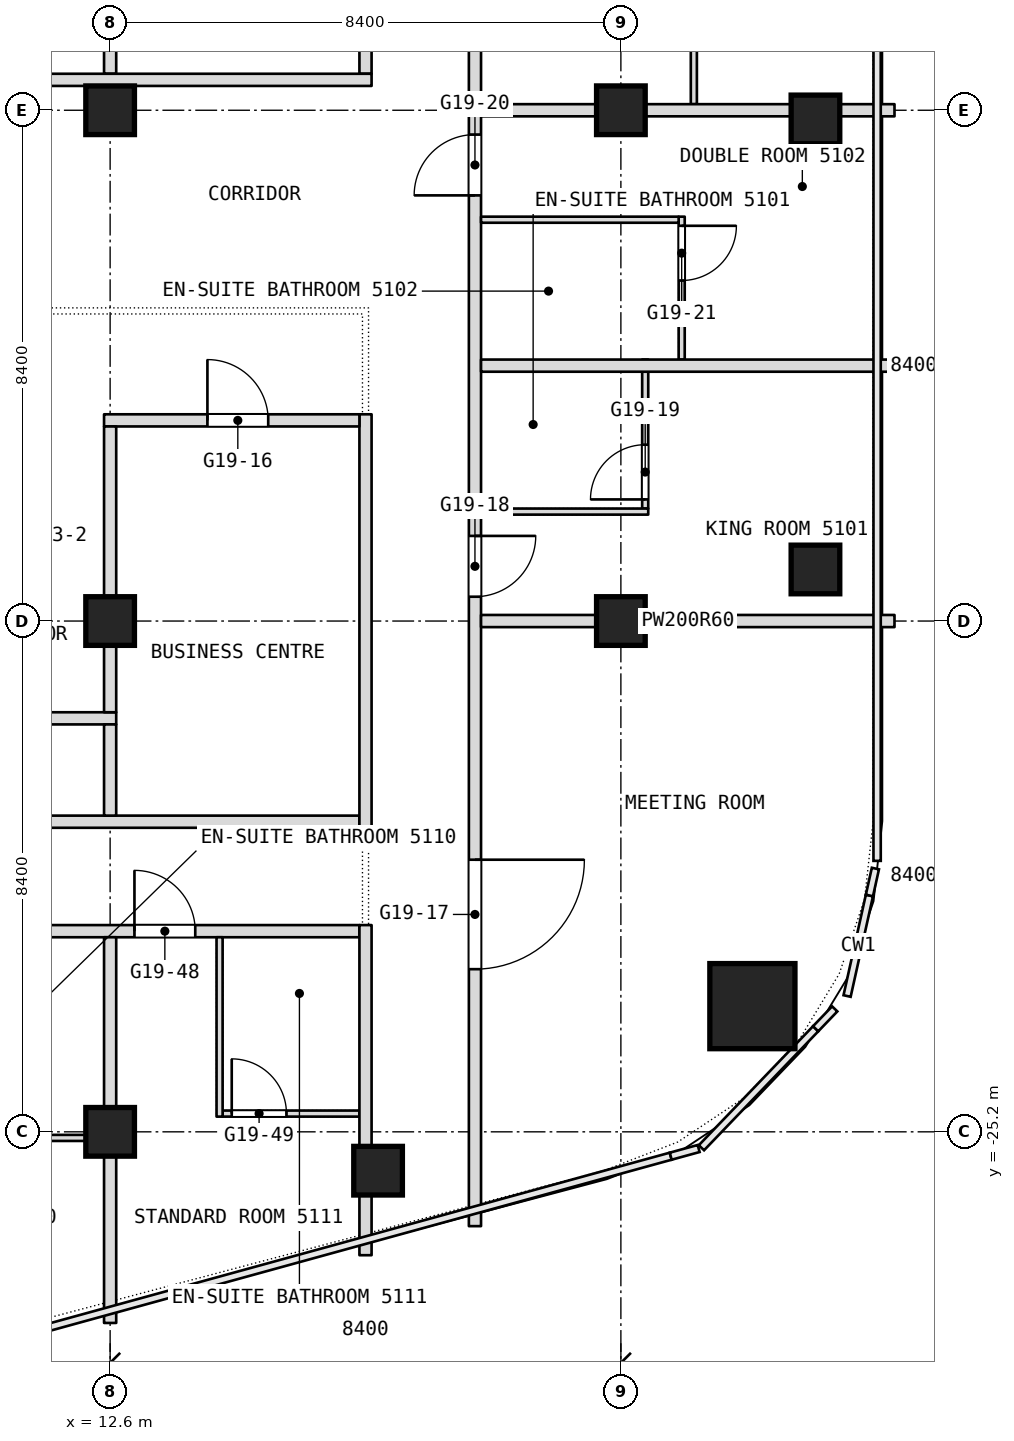
"""IFC4 building model, lengths in metres.
Left out: names, types, materials, properties, quantities, classifications, styles, units other than length and angle.
Written with IfcOpenShell. Run it as: python <this file> out.ifc"""

import sys

from ifc_helpers import new_model, si_unit, direction, frame, frame_2d, origin, origin_2d, place, context, subcontext, project, spatial, rectangle, extrude, element, fill, save


model = new_model("IFC4")
c1 = context("Model", 3, precision=1e-05, world=origin(), true_north=direction((0.0, 1.0)))
c2 = subcontext(c1, "Body", "Model", "MODEL_VIEW")
j1 = project(units=[si_unit("LENGTHUNIT", "METRE"), si_unit("PLANEANGLEUNIT", "RADIAN")], contexts=[c1])
p1 = place(None, origin())
s1 = spatial("IfcSite", under=j1, at=p1, CompositionType="ELEMENT")
p2 = place(p1, origin())
s2 = spatial("IfcBuilding", under=s1, at=p2, CompositionType="ELEMENT")
p3 = place(p2, frame((0.0, 0.0, 220.1)))
s3 = spatial("IfcBuildingStorey", under=s2, at=p3, CompositionType="ELEMENT", Elevation=220.1)
p4 = place(p3, frame((23.163, -23.133, 0.0), z_axis=(0.0, 0.0, 1.0), x_axis=(1.0, 0.0, 0.0)))
e1 = element("IfcColumn", 1, at=p4, inside=s3, PredefinedType="COLUMN", context=c2, shape_type="SweptSolid", body=[
    extrude(rectangle(XDim=1.4, YDim=1.4, at=origin_2d()), origin(), (0.0, 0.0, 1.0), 3.6),
])
for number, where, z_axis, x_axis in (
    (2, (12.6, -25.2, 0.0), (0.0, 0.0, 1.0), (1.0, 0.0, 0.0)),
    (3, (12.6, -16.8, 0.0), (0.0, 0.0, 1.0), (1.0, 0.0, 0.0)),
    (4, (12.6, -8.4, 0.0), (0.0, 0.0, 1.0), (1.0, 0.0, 0.0)),
    (5, (21.0, -16.8, 0.0), (0.0, 0.0, 1.0), (1.0, 0.0, 0.0)),
    (6, (21.0, -8.4, 0.0), (0.0, 0.0, 1.0), (1.0, 0.0, 0.0)),
    (7, (24.2, -8.551, 0.0), (0.0, 0.0, 1.0), (1.0, 0.0, 0.0)),
    (8, (24.2, -15.952, 0.0), (0.0, 0.0, 1.0), (1.0, 0.0, 0.0)),
    (9, (17.007, -25.839, 0.0), (0.0, 0.0, 1.0), (1.0, 0.0, 0.0)),
):
    element("IfcColumn", number, at=place(p3, frame(where, z_axis=z_axis, x_axis=x_axis)), inside=s3, PredefinedType="COLUMN", context=c2, shape_type="SweptSolid", body=[
        extrude(rectangle(XDim=0.8, YDim=0.8, at=origin_2d()), origin(), (0.0, 0.0, 1.0), 3.6),
    ])
p5 = place(p3, frame((10.25, -25.3, 0.0), z_axis=(0.0, 0.0, 1.0), x_axis=(1.0, 0.0, 0.0)))
e10 = element("IfcWall", 10, at=p5, inside=s3, PredefinedType="PARTITIONING", context=c2, shape_type="SweptSolid", body=[
    extrude(rectangle(XDim=2.45, YDim=0.1, at=frame_2d((1.225, 0.0))), origin(), (0.0, 0.0, 1.0), 2.94),
])
p6 = place(p5, frame((0.15, 0.0, 0.0)))
e11 = element("IfcOpeningElement", 11, at=p6, cuts=e10, PredefinedType="OPENING", context=c2, shape_type="SweptSolid", body=[
    extrude(rectangle(XDim=0.9, YDim=2.1, at=frame_2d((0.45, 1.05))), frame((0.0, 0.05, 0.0), z_axis=(0.0, -1.0, 0.0), x_axis=(1.0, 0.0, 0.0)), (0.0, 0.0, 1.0), 0.1),
])
p7 = place(p3, frame((14.45, -24.9, 0.0), z_axis=(0.0, 0.0, 1.0), x_axis=(1.0, 0.0, 0.0)))
e12 = element("IfcWall", 12, at=p7, inside=s3, PredefinedType="PARTITIONING", context=c2, shape_type="SweptSolid", body=[
    extrude(rectangle(XDim=2.25, YDim=0.1, at=frame_2d((1.125, 0.0))), origin(), (0.0, 0.0, 1.0), 3.34),
])
p8 = place(p7, frame((0.15, 0.0, 0.0)))
e13 = element("IfcOpeningElement", 13, at=p8, cuts=e12, PredefinedType="OPENING", context=c2, shape_type="SweptSolid", body=[
    extrude(rectangle(XDim=0.9, YDim=2.1, at=frame_2d((0.45, 1.05))), frame((0.0, 0.05, 0.0), z_axis=(0.0, -1.0, 0.0), x_axis=(1.0, 0.0, 0.0)), (0.0, 0.0, 1.0), 0.1),
])
p9 = place(p3, frame((22.2, -8.3, 0.0), z_axis=(0.0, 0.0, 1.0), x_axis=(0.0, 1.0, 0.0)))
e14 = element("IfcWall", 14, at=p9, inside=s3, PredefinedType="PARTITIONING", context=c2, shape_type="SweptSolid", body=[
    extrude(rectangle(XDim=3.55, YDim=0.1, at=frame_2d((1.775, 0.0))), origin(), (0.0, 0.0, 1.0), 3.34),
])
p10 = place(p9, frame((2.5, 0.0, 0.0)))
e15 = element("IfcOpeningElement", 15, at=p10, cuts=e14, PredefinedType="OPENING", context=c2, shape_type="SweptSolid", body=[
    extrude(rectangle(XDim=0.9, YDim=2.1, at=frame_2d((0.45, 1.05))), frame((0.0, 0.05, 0.0), z_axis=(0.0, -1.0, 0.0), x_axis=(1.0, 0.0, 0.0)), (0.0, 0.0, 1.0), 0.1),
])
p11 = place(p3, frame((22.0, -12.5, 0.0), z_axis=(0.0, 0.0, 1.0), x_axis=(0.0, 1.0, 0.0)))
e16 = element("IfcWall", 16, at=p11, inside=s3, PredefinedType="PARTITIONING", context=c2, shape_type="SweptSolid", body=[
    extrude(rectangle(XDim=2.35, YDim=0.1, at=frame_2d((1.175, 0.0))), origin(), (0.0, 0.0, 1.0), 3.34),
])
p12 = place(p11, frame((1.3, 0.0, 0.0)))
e17 = element("IfcOpeningElement", 17, at=p12, cuts=e16, PredefinedType="OPENING", context=c2, shape_type="SweptSolid", body=[
    extrude(rectangle(XDim=0.9, YDim=2.1, at=frame_2d((0.45, 1.05))), frame((0.0, 0.05, 0.0), z_axis=(0.0, -1.0, 0.0), x_axis=(1.0, 0.0, 0.0)), (0.0, 0.0, 1.0), 0.1),
])
p13 = place(p3, frame((-16.7, -21.9, 0.0), z_axis=(0.0, 0.0, 1.0), x_axis=(1.0, 0.0, 0.0)))
e18 = element("IfcWall", 18, at=p13, inside=s3, PredefinedType="PARTITIONING", context=c2, shape_type="SweptSolid", body=[
    extrude(rectangle(XDim=33.4, YDim=0.2, at=frame_2d((16.7, 0.0))), origin(), (0.0, 0.0, 1.0), 3.34),
])
p14 = place(p13, frame((0.3, 0.0, 0.0)))
e19 = element("IfcOpeningElement", 19, at=p14, cuts=e18, PredefinedType="OPENING", context=c2, shape_type="SweptSolid", body=[
    extrude(rectangle(XDim=1.0, YDim=2.1, at=frame_2d((0.5, 1.05))), frame((0.0, 0.1, 0.0), z_axis=(0.0, -1.0, 0.0), x_axis=(1.0, 0.0, 0.0)), (0.0, 0.0, 1.0), 0.2),
])
p15 = place(p13, frame((7.8, 0.0, 0.0)))
e20 = element("IfcOpeningElement", 20, at=p15, cuts=e18, PredefinedType="OPENING", context=c2, shape_type="SweptSolid", body=[
    extrude(rectangle(XDim=1.1, YDim=2.1, at=frame_2d((0.55, 1.05))), frame((0.0, 0.1, 0.0), z_axis=(0.0, -1.0, 0.0), x_axis=(1.0, 0.0, 0.0)), (0.0, 0.0, 1.0), 0.2),
])
p16 = place(p13, frame((14.05, 0.0, 0.0)))
e21 = element("IfcOpeningElement", 21, at=p16, cuts=e18, PredefinedType="OPENING", context=c2, shape_type="SweptSolid", body=[
    extrude(rectangle(XDim=1.1, YDim=2.1, at=frame_2d((0.55, 1.05))), frame((0.0, 0.1, 0.0), z_axis=(0.0, -1.0, 0.0), x_axis=(1.0, 0.0, 0.0)), (0.0, 0.0, 1.0), 0.2),
])
p17 = place(p13, frame((23.7, 0.0, 0.0)))
e22 = element("IfcOpeningElement", 22, at=p17, cuts=e18, PredefinedType="OPENING", context=c2, shape_type="SweptSolid", body=[
    extrude(rectangle(XDim=1.0, YDim=2.1, at=frame_2d((0.5, 1.05))), frame((0.0, 0.1, 0.0), z_axis=(0.0, -1.0, 0.0), x_axis=(1.0, 0.0, 0.0)), (0.0, 0.0, 1.0), 0.2),
])
p18 = place(p13, frame((25.5, 0.0, 0.0)))
e23 = element("IfcOpeningElement", 23, at=p18, cuts=e18, PredefinedType="OPENING", context=c2, shape_type="SweptSolid", body=[
    extrude(rectangle(XDim=1.0, YDim=2.1, at=frame_2d((0.5, 1.05))), frame((0.0, 0.1, 0.0), z_axis=(0.0, -1.0, 0.0), x_axis=(1.0, 0.0, 0.0)), (0.0, 0.0, 1.0), 0.2),
])
p19 = place(p13, frame((29.7, 0.0, 0.0)))
e24 = element("IfcOpeningElement", 24, at=p19, cuts=e18, PredefinedType="OPENING", context=c2, shape_type="SweptSolid", body=[
    extrude(rectangle(XDim=1.0, YDim=2.1, at=frame_2d((0.5, 1.05))), frame((0.0, 0.1, 0.0), z_axis=(0.0, -1.0, 0.0), x_axis=(1.0, 0.0, 0.0)), (0.0, 0.0, 1.0), 0.2),
])
p20 = place(p3, frame((21.4, -14.95, 0.0), z_axis=(0.0, 0.0, 1.0), x_axis=(0.0, 1.0, 0.0)))
e25 = element("IfcWall", 25, at=p20, inside=s3, PredefinedType="PARTITIONING", context=c2, shape_type="SweptSolid", body=[
    extrude(rectangle(XDim=2.45, YDim=0.1, at=frame_2d((1.225, 0.0))), origin(), (0.0, 0.0, 1.0), 3.34),
])
p21 = place(p20, frame((0.15, 0.0, 0.0)))
e26 = element("IfcOpeningElement", 26, at=p21, cuts=e25, PredefinedType="OPENING", context=c2, shape_type="SweptSolid", body=[
    extrude(rectangle(XDim=0.9, YDim=2.1, at=frame_2d((0.45, 1.05))), frame((0.0, 0.05, 0.0), z_axis=(0.0, -1.0, 0.0), x_axis=(1.0, 0.0, 0.0)), (0.0, 0.0, 1.0), 0.1),
])
p22 = place(p3, frame((-16.7, -20.1, 0.0), z_axis=(0.0, 0.0, 1.0), x_axis=(1.0, 0.0, 0.0)))
e27 = element("IfcWall", 27, at=p22, inside=s3, PredefinedType="PARTITIONING", context=c2, shape_type="SweptSolid", body=[
    extrude(rectangle(XDim=33.4, YDim=0.2, at=frame_2d((16.7, 0.0))), origin(), (0.0, 0.0, 1.0), 3.34),
])
p23 = place(p3, frame((18.6, -26.751, 0.0), z_axis=(0.0, 0.0, 1.0), x_axis=(0.0, 1.0, 0.0)))
e28 = element("IfcWall", 28, at=p23, inside=s3, PredefinedType="PARTITIONING", context=c2, shape_type="SweptSolid", body=[
    extrude(rectangle(XDim=49.091, YDim=0.2, at=frame_2d((24.545, 0.0))), origin(), (0.0, 0.0, 1.0), 3.34),
])
p24 = place(p23, frame((4.226, 0.0, 0.0)))
e29 = element("IfcOpeningElement", 29, at=p24, cuts=e28, PredefinedType="OPENING", context=c2, shape_type="SweptSolid", body=[
    extrude(rectangle(XDim=1.8, YDim=2.1, at=frame_2d((0.9, 1.05))), frame((0.0, 0.1, 0.0), z_axis=(0.0, -1.0, 0.0), x_axis=(1.0, 0.0, 0.0)), (0.0, 0.0, 1.0), 0.2),
])
p25 = place(p23, frame((10.351, 0.0, 0.0)))
e30 = element("IfcOpeningElement", 30, at=p25, cuts=e28, PredefinedType="OPENING", context=c2, shape_type="SweptSolid", body=[
    extrude(rectangle(XDim=1.0, YDim=2.1, at=frame_2d((0.5, 1.05))), frame((0.0, 0.1, 0.0), z_axis=(0.0, -1.0, 0.0), x_axis=(1.0, 0.0, 0.0)), (0.0, 0.0, 1.0), 0.2),
])
p26 = place(p23, frame((16.951, 0.0, 0.0)))
e31 = element("IfcOpeningElement", 31, at=p26, cuts=e28, PredefinedType="OPENING", context=c2, shape_type="SweptSolid", body=[
    extrude(rectangle(XDim=1.0, YDim=2.1, at=frame_2d((0.5, 1.05))), frame((0.0, 0.1, 0.0), z_axis=(0.0, -1.0, 0.0), x_axis=(1.0, 0.0, 0.0)), (0.0, 0.0, 1.0), 0.2),
])
p27 = place(p23, frame((22.051, 0.0, 0.0)))
e32 = element("IfcOpeningElement", 32, at=p27, cuts=e28, PredefinedType="OPENING", context=c2, shape_type="SweptSolid", body=[
    extrude(rectangle(XDim=1.1, YDim=2.1, at=frame_2d((0.55, 1.05))), frame((0.0, 0.1, 0.0), z_axis=(0.0, -1.0, 0.0), x_axis=(1.0, 0.0, 0.0)), (0.0, 0.0, 1.0), 0.2),
])
p28 = place(p23, frame((30.051, 0.0, 0.0)))
e33 = element("IfcOpeningElement", 33, at=p28, cuts=e28, PredefinedType="OPENING", context=c2, shape_type="SweptSolid", body=[
    extrude(rectangle(XDim=1.8, YDim=2.1, at=frame_2d((0.9, 1.05))), frame((0.0, 0.1, 0.0), z_axis=(0.0, -1.0, 0.0), x_axis=(1.0, 0.0, 0.0)), (0.0, 0.0, 1.0), 0.2),
])
p29 = place(p23, frame((38.851, 0.0, 0.0)))
e34 = element("IfcOpeningElement", 34, at=p29, cuts=e28, PredefinedType="OPENING", context=c2, shape_type="SweptSolid", body=[
    extrude(rectangle(XDim=1.1, YDim=2.1, at=frame_2d((0.55, 1.05))), frame((0.0, 0.1, 0.0), z_axis=(0.0, -1.0, 0.0), x_axis=(1.0, 0.0, 0.0)), (0.0, 0.0, 1.0), 0.2),
])
p30 = place(p23, frame((44.051, 0.0, 0.0)))
e35 = element("IfcOpeningElement", 35, at=p30, cuts=e28, PredefinedType="OPENING", context=c2, shape_type="SweptSolid", body=[
    extrude(rectangle(XDim=1.0, YDim=2.1, at=frame_2d((0.5, 1.05))), frame((0.0, 0.1, 0.0), z_axis=(0.0, -1.0, 0.0), x_axis=(1.0, 0.0, 0.0)), (0.0, 0.0, 1.0), 0.2),
])
p31 = place(p3, frame((5.7, -18.4, 0.0), z_axis=(0.0, 0.0, 1.0), x_axis=(1.0, 0.0, 0.0)))
e36 = element("IfcWall", 36, at=p31, inside=s3, PredefinedType="PARTITIONING", context=c2, shape_type="SweptSolid", body=[
    extrude(rectangle(XDim=7.0, YDim=0.2, at=frame_2d((3.5, 0.0))), origin(), (0.0, 0.0, 1.0), 3.34),
])
p32 = place(p31, frame((1.8, 0.0, 0.0)))
e37 = element("IfcOpeningElement", 37, at=p32, cuts=e36, PredefinedType="OPENING", context=c2, shape_type="SweptSolid", body=[
    extrude(rectangle(XDim=1.8, YDim=2.1, at=frame_2d((0.9, 1.05))), frame((0.0, 0.1, 0.0), z_axis=(0.0, -1.0, 0.0), x_axis=(1.0, 0.0, 0.0)), (0.0, 0.0, 1.0), 0.2),
])
p33 = place(p3, frame((16.8, -27.229, 0.0), z_axis=(0.0, 0.0, 1.0), x_axis=(0.0, 1.0, 0.0)))
e38 = element("IfcWall", 38, at=p33, inside=s3, PredefinedType="PARTITIONING", context=c2, shape_type="SweptSolid", body=[
    extrude(rectangle(XDim=5.429, YDim=0.2, at=frame_2d((2.714, 0.0))), origin(), (0.0, 0.0, 1.0), 3.34),
])
p34 = place(p3, frame((16.8, -20.2, 0.0), z_axis=(0.0, 0.0, 1.0), x_axis=(0.0, 1.0, 0.0)))
e39 = element("IfcWall", 39, at=p34, inside=s3, PredefinedType="PARTITIONING", context=c2, shape_type="SweptSolid", body=[
    extrude(rectangle(XDim=6.8, YDim=0.2, at=frame_2d((3.4, 0.0))), origin(), (0.0, 0.0, 1.0), 3.34),
])
p35 = place(p3, frame((16.8, -7.8, 0.0), z_axis=(0.0, 0.0, 1.0), x_axis=(0.0, 1.0, 0.0)))
e40 = element("IfcWall", 40, at=p35, inside=s3, PredefinedType="PARTITIONING", context=c2, shape_type="SweptSolid", body=[
    extrude(rectangle(XDim=5.9, YDim=0.2, at=frame_2d((2.95, 0.0))), origin(), (0.0, 0.0, 1.0), 3.34),
])
p36 = place(p3, frame((18.7, -16.8, 0.0), z_axis=(0.0, 0.0, 1.0), x_axis=(1.0, 0.0, 0.0)))
e41 = element("IfcWall", 41, at=p36, inside=s3, PredefinedType="PARTITIONING", context=c2, shape_type="SweptSolid", body=[
    extrude(rectangle(XDim=6.8, YDim=0.2, at=frame_2d((3.4, 0.0))), origin(), (0.0, 0.0, 1.0), 2.94),
])
p37 = place(p3, frame((18.7, -15.0, 0.0), z_axis=(0.0, 0.0, 1.0), x_axis=(1.0, 0.0, 0.0)))
e42 = element("IfcWall", 42, at=p37, inside=s3, PredefinedType="PARTITIONING", context=c2, shape_type="SweptSolid", body=[
    extrude(rectangle(XDim=2.75, YDim=0.1, at=frame_2d((1.375, 0.0))), origin(), (0.0, 0.0, 1.0), 3.34),
])
p38 = place(p3, frame((14.4, -24.95, 0.0), z_axis=(0.0, 0.0, 1.0), x_axis=(0.0, 1.0, 0.0)))
e43 = element("IfcWall", 43, at=p38, inside=s3, PredefinedType="PARTITIONING", context=c2, shape_type="SweptSolid", body=[
    extrude(rectangle(XDim=2.95, YDim=0.1, at=frame_2d((1.475, 0.0))), origin(), (0.0, 0.0, 1.0), 3.34),
])
p39 = place(p3, frame((12.5, -13.5, 0.0), z_axis=(0.0, 0.0, 1.0), x_axis=(1.0, 0.0, 0.0)))
e44 = element("IfcWall", 44, at=p39, inside=s3, PredefinedType="PARTITIONING", context=c2, shape_type="SweptSolid", body=[
    extrude(rectangle(XDim=4.2, YDim=0.2, at=frame_2d((2.1, 0.0))), origin(), (0.0, 0.0, 1.0), 3.34),
])
p40 = place(p39, frame((1.7, 0.0, 0.0)))
e45 = element("IfcOpeningElement", 45, at=p40, cuts=e44, PredefinedType="OPENING", context=c2, shape_type="SweptSolid", body=[
    extrude(rectangle(XDim=1.0, YDim=2.1, at=frame_2d((0.5, 1.05))), frame((0.0, 0.1, 0.0), z_axis=(0.0, -1.0, 0.0), x_axis=(1.0, 0.0, 0.0)), (0.0, 0.0, 1.0), 0.2),
])
p41 = place(p3, frame((12.6, -28.343, 0.0), z_axis=(0.0, 0.0, 1.0), x_axis=(0.0, 1.0, 0.0)))
e46 = element("IfcWall", 46, at=p41, inside=s3, PredefinedType="PARTITIONING", context=c2, shape_type="SweptSolid", body=[
    extrude(rectangle(XDim=6.343, YDim=0.2, at=frame_2d((3.171, 0.0))), origin(), (0.0, 0.0, 1.0), 3.34),
])
p42 = place(p3, frame((12.6, -20.0, 0.0), z_axis=(0.0, 0.0, 1.0), x_axis=(0.0, 1.0, 0.0)))
e47 = element("IfcWall", 47, at=p42, inside=s3, PredefinedType="PARTITIONING", context=c2, shape_type="SweptSolid", body=[
    extrude(rectangle(XDim=1.5, YDim=0.2, at=frame_2d((0.75, 0.0))), origin(), (0.0, 0.0, 1.0), 3.34),
])
p43 = place(p3, frame((12.6, -7.8, 0.0), z_axis=(0.0, 0.0, 1.0), x_axis=(0.0, 1.0, 0.0)))
e48 = element("IfcWall", 48, at=p43, inside=s3, PredefinedType="PARTITIONING", context=c2, shape_type="SweptSolid", body=[
    extrude(rectangle(XDim=5.9, YDim=0.2, at=frame_2d((2.95, 0.0))), origin(), (0.0, 0.0, 1.0), 3.34),
])
p44 = place(p3, frame((12.6, -18.3, 0.0), z_axis=(0.0, 0.0, 1.0), x_axis=(0.0, 1.0, 0.0)))
e49 = element("IfcWall", 49, at=p44, inside=s3, PredefinedType="PARTITIONING", context=c2, shape_type="SweptSolid", body=[
    extrude(rectangle(XDim=4.7, YDim=0.2, at=frame_2d((2.35, 0.0))), origin(), (0.0, 0.0, 1.0), 3.34),
])
p45 = place(p3, frame((18.7, -12.6, 0.0), z_axis=(0.0, 0.0, 1.0), x_axis=(1.0, 0.0, 0.0)))
e50 = element("IfcWall", 50, at=p45, inside=s3, PredefinedType="PARTITIONING", context=c2, shape_type="SweptSolid", body=[
    extrude(rectangle(XDim=6.8, YDim=0.2, at=frame_2d((3.4, 0.0))), origin(), (0.0, 0.0, 1.0), 3.34),
])
p46 = place(p3, frame((18.7, -10.2, 0.0), z_axis=(0.0, 0.0, 1.0), x_axis=(1.0, 0.0, 0.0)))
e51 = element("IfcWall", 51, at=p46, inside=s3, PredefinedType="PARTITIONING", context=c2, shape_type="SweptSolid", body=[
    extrude(rectangle(XDim=3.25, YDim=0.1, at=frame_2d((1.625, 0.0))), origin(), (0.0, 0.0, 1.0), 3.34),
])
p47 = place(p3, frame((18.7, -8.4, 0.0), z_axis=(0.0, 0.0, 1.0), x_axis=(1.0, 0.0, 0.0)))
e52 = element("IfcWall", 52, at=p47, inside=s3, PredefinedType="PARTITIONING", context=c2, shape_type="SweptSolid", body=[
    extrude(rectangle(XDim=6.8, YDim=0.2, at=frame_2d((3.4, 0.0))), origin(), (0.0, 0.0, 1.0), 2.94),
])
p48 = place(p3, frame((10.6, -7.9, 0.0), z_axis=(0.0, 0.0, 1.0), x_axis=(1.0, 0.0, 0.0)))
e53 = element("IfcWall", 53, at=p48, inside=s3, PredefinedType="PARTITIONING", context=c2, shape_type="SweptSolid", body=[
    extrude(rectangle(XDim=6.3, YDim=0.2, at=frame_2d((3.15, 0.0))), origin(), (0.0, 0.0, 1.0), 3.34),
])
p49 = place(p8, origin())
e54 = element("IfcDoor", 54, at=p49, inside=s3, OperationType="SINGLE_SWING_LEFT", PredefinedType="DOOR", context=c2, shape_type="SweptSolid", body=[
    extrude(rectangle(XDim=0.9, YDim=2.1, at=frame_2d((0.45, 1.05))), frame((0.0, 0.025, 0.0), z_axis=(0.0, -1.0, 0.0), x_axis=(1.0, 0.0, 0.0)), (0.0, 0.0, 1.0), 0.05),
])
fill(e13, e54)
p50 = place(p12, origin())
e55 = element("IfcDoor", 55, at=p50, inside=s3, OperationType="SINGLE_SWING_RIGHT", PredefinedType="DOOR", context=c2, shape_type="SweptSolid", body=[
    extrude(rectangle(XDim=0.9, YDim=2.1, at=frame_2d((0.45, 1.05))), frame((0.0, 0.025, 0.0), z_axis=(0.0, -1.0, 0.0), x_axis=(1.0, 0.0, 0.0)), (0.0, 0.0, 1.0), 0.05),
])
fill(e17, e55)
p51 = place(p19, origin())
e56 = element("IfcDoor", 56, at=p51, inside=s3, OperationType="SINGLE_SWING_RIGHT", PredefinedType="DOOR", context=c2, shape_type="SweptSolid", body=[
    extrude(rectangle(XDim=1.0, YDim=2.1, at=frame_2d((0.5, 1.05))), frame((0.0, 0.025, 0.0), z_axis=(0.0, -1.0, 0.0), x_axis=(1.0, 0.0, 0.0)), (0.0, 0.0, 1.0), 0.05),
])
fill(e24, e56)
p52 = place(p21, origin())
e57 = element("IfcDoor", 57, at=p52, inside=s3, OperationType="SINGLE_SWING_LEFT", PredefinedType="DOOR", context=c2, shape_type="SweptSolid", body=[
    extrude(rectangle(XDim=0.9, YDim=2.1, at=frame_2d((0.45, 1.05))), frame((0.0, 0.025, 0.0), z_axis=(0.0, -1.0, 0.0), x_axis=(1.0, 0.0, 0.0)), (0.0, 0.0, 1.0), 0.05),
])
fill(e26, e57)
p53 = place(p24, origin())
e58 = element("IfcDoor", 58, at=p53, inside=s3, OperationType="DOUBLE_DOOR_SINGLE_SWING", PredefinedType="DOOR", context=c2, shape_type="SweptSolid", body=[
    extrude(rectangle(XDim=1.8, YDim=2.1, at=frame_2d((0.9, 1.05))), frame((0.0, 0.025, 0.0), z_axis=(0.0, -1.0, 0.0), x_axis=(1.0, 0.0, 0.0)), (0.0, 0.0, 1.0), 0.05),
])
fill(e29, e58)
p54 = place(p25, origin())
e59 = element("IfcDoor", 59, at=p54, inside=s3, OperationType="SINGLE_SWING_RIGHT", PredefinedType="DOOR", context=c2, shape_type="SweptSolid", body=[
    extrude(rectangle(XDim=1.0, YDim=2.1, at=frame_2d((0.5, 1.05))), frame((0.0, 0.025, 0.0), z_axis=(0.0, -1.0, 0.0), x_axis=(1.0, 0.0, 0.0)), (0.0, 0.0, 1.0), 0.05),
])
fill(e30, e59)
p55 = place(p26, origin())
e60 = element("IfcDoor", 60, at=p55, inside=s3, OperationType="SINGLE_SWING_RIGHT", PredefinedType="DOOR", context=c2, shape_type="SweptSolid", body=[
    extrude(rectangle(XDim=1.0, YDim=2.1, at=frame_2d((0.5, 1.05))), frame((0.0, 0.025, 0.0), z_axis=(0.0, -1.0, 0.0), x_axis=(1.0, 0.0, 0.0)), (0.0, 0.0, 1.0), 0.05),
])
fill(e31, e60)
p56 = place(p40, origin())
e61 = element("IfcDoor", 61, at=p56, inside=s3, OperationType="SINGLE_SWING_RIGHT", PredefinedType="DOOR", context=c2, shape_type="SweptSolid", body=[
    extrude(rectangle(XDim=1.0, YDim=2.1, at=frame_2d((0.5, 1.05))), frame((0.0, 0.025, 0.0), z_axis=(0.0, -1.0, 0.0), x_axis=(1.0, 0.0, 0.0)), (0.0, 0.0, 1.0), 0.05),
])
fill(e45, e61)
save(model, sys.argv[1])
